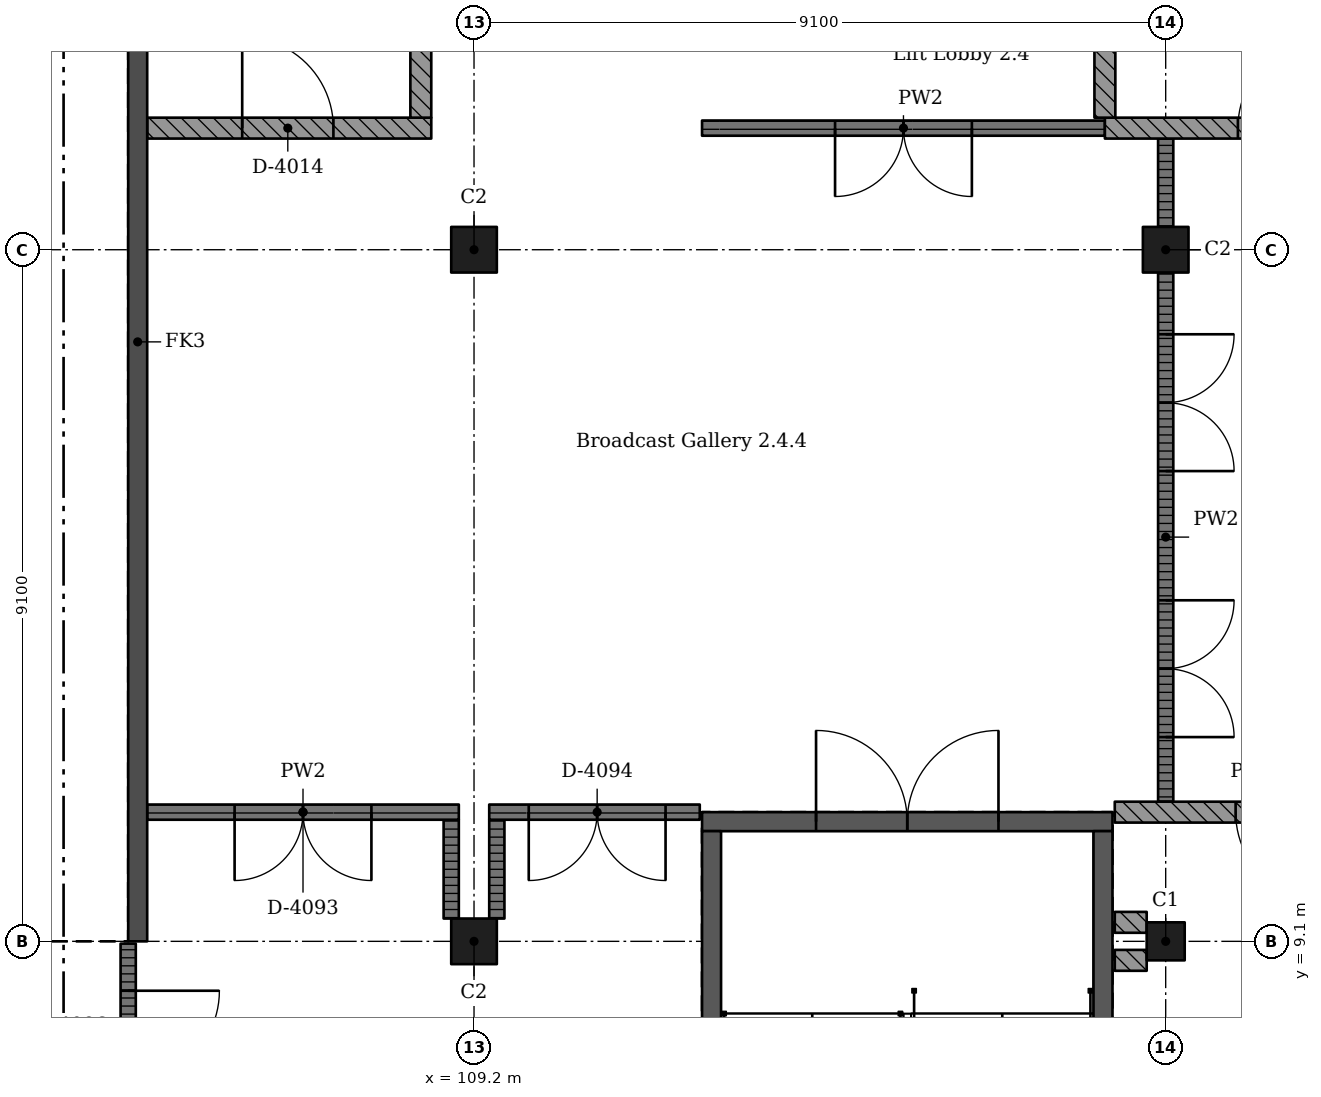
"""IFC4 building model, lengths in metres.
Left out: names, types, materials, properties, quantities, classifications, styles, units other than length and angle.
Written with IfcOpenShell. Run it as: python <this file> out.ifc"""

import sys

from ifc_helpers import new_model, si_unit, direction, frame, frame_2d, origin, origin_2d, place, context, subcontext, project, spatial, rectangle, extrude, element, fill, save


model = new_model("IFC4")
c1 = context("Model", 3, precision=1e-05, world=origin(), true_north=direction((0.0, 1.0)))
c2 = subcontext(c1, "Body", "Model", "MODEL_VIEW")
j1 = project(units=[si_unit("LENGTHUNIT", "METRE"), si_unit("PLANEANGLEUNIT", "RADIAN")], contexts=[c1])
p1 = place(None, origin())
s1 = spatial("IfcSite", under=j1, at=p1, CompositionType="ELEMENT")
p2 = place(p1, origin())
s2 = spatial("IfcBuilding", under=s1, at=p2, CompositionType="ELEMENT")
p3 = place(p2, frame((0.0, 0.0, 20.02)))
s3 = spatial("IfcBuildingStorey", under=s2, at=p3, CompositionType="ELEMENT", Elevation=20.02)
for number, where, z_axis, x_axis in (
    (1, (109.2, 9.1, 0.0), (0.0, 0.0, 1.0), (1.0, 0.0, 0.0)),
    (2, (109.2, 18.2, 0.0), (0.0, 0.0, 1.0), (1.0, 0.0, 0.0)),
):
    element("IfcColumn", number, at=place(p3, frame(where, z_axis=z_axis, x_axis=x_axis)), inside=s3, PredefinedType="COLUMN", context=c2, shape_type="SweptSolid", body=[
        extrude(rectangle(XDim=0.6, YDim=0.6, at=origin_2d()), origin(), (0.0, 0.0, 1.0), 4.55),
    ])
p4 = place(p3, frame((118.3, 9.1, 0.0), z_axis=(0.0, 0.0, 1.0), x_axis=(1.0, 0.0, 0.0)))
e3 = element("IfcColumn", 3, at=p4, inside=s3, PredefinedType="COLUMN", context=c2, shape_type="SweptSolid", body=[
    extrude(rectangle(XDim=0.5, YDim=0.5, at=origin_2d()), origin(), (0.0, 0.0, 1.0), 4.55),
])
p5 = place(p3, frame((118.3, 18.2, 0.0), z_axis=(0.0, 0.0, 1.0), x_axis=(1.0, 0.0, 0.0)))
e4 = element("IfcColumn", 4, at=p5, inside=s3, PredefinedType="COLUMN", context=c2, shape_type="SweptSolid", body=[
    extrude(rectangle(XDim=0.6, YDim=0.6, at=origin_2d()), origin(), (0.0, 0.0, 1.0), 4.55),
])
p6 = place(p3, frame((104.775, 40.95, 0.0), z_axis=(0.0, 0.0, 1.0), x_axis=(0.0, -1.0, 0.0)))
e5 = element("IfcWall", 5, at=p6, inside=s3, PredefinedType="SHEAR", context=c2, shape_type="SweptSolid", body=[
    extrude(rectangle(XDim=31.85, YDim=0.25, at=frame_2d((15.925, 0.0))), origin(), (0.0, 0.0, 1.0), 4.55),
])
p7 = place(p3, frame((117.6, 10.675, 0.0), z_axis=(0.0, 0.0, 1.0), x_axis=(-1.0, 0.0, 0.0)))
e6 = element("IfcWall", 6, at=p7, inside=s3, PredefinedType="SHEAR", context=c2, shape_type="SweptSolid", body=[
    extrude(rectangle(XDim=5.4, YDim=0.25, at=frame_2d((2.7, 0.0))), origin(), (0.0, 0.0, 1.0), 4.55),
])
p8 = place(p7, frame((1.5, 0.0, 0.0)))
e7 = element("IfcOpeningElement", 7, at=p8, cuts=e6, PredefinedType="OPENING", context=c2, shape_type="SweptSolid", body=[
    extrude(rectangle(XDim=2.4, YDim=2.1, at=frame_2d((1.2, 1.05))), frame((0.0, 0.135, 0.0), z_axis=(0.0, -1.0, 0.0), x_axis=(1.0, 0.0, 0.0)), (0.0, 0.0, 1.0), 0.27),
])
for number, where, z_axis, x_axis in (
    (8, (112.325, 10.55, 0.0), (0.0, 0.0, 1.0), (0.0, -1.0, 0.0)),
    (9, (117.475, 10.55, 0.0), (0.0, 0.0, 1.0), (0.0, -1.0, 0.0)),
):
    element("IfcWall", number, at=place(p3, frame(where, z_axis=z_axis, x_axis=x_axis)), inside=s3, PredefinedType="SHEAR", context=c2, shape_type="SweptSolid", body=[
        extrude(rectangle(XDim=9.6, YDim=0.25, at=frame_2d((4.8, 0.0))), origin(), (0.0, 0.0, 1.0), 4.55),
    ])
p9 = place(p3, frame((104.65, 5.5, 0.0), z_axis=(0.0, 0.0, 1.0), x_axis=(0.0, 1.0, 0.0)))
e10 = element("IfcWall", 10, at=p9, inside=s3, PredefinedType="PARTITIONING", context=c2, shape_type="SweptSolid", body=[
    extrude(rectangle(XDim=3.57, YDim=0.2, at=frame_2d((1.785, 0.0))), origin(), (0.0, 0.0, 1.0), 4.25),
])
p10 = place(p9, frame((0.55, 0.0, 0.0)))
e11 = element("IfcOpeningElement", 11, at=p10, cuts=e10, PredefinedType="OPENING", context=c2, shape_type="SweptSolid", body=[
    extrude(rectangle(XDim=2.4, YDim=2.4, at=frame_2d((1.2, 1.2))), frame((0.0, 0.11, 0.0), z_axis=(0.0, -1.0, 0.0), x_axis=(1.0, 0.0, 0.0)), (0.0, 0.0, 1.0), 0.22),
])
p11 = place(p3, frame((104.9, 19.8, 0.0), z_axis=(0.0, 0.0, 1.0), x_axis=(1.0, 0.0, 0.0)))
e12 = element("IfcWall", 12, at=p11, inside=s3, PredefinedType="SOLIDWALL", context=c2, shape_type="SweptSolid", body=[
    extrude(rectangle(XDim=3.738, YDim=0.275, at=frame_2d((1.869, 0.0))), origin(), (0.0, 0.0, 1.0), 4.25),
])
p12 = place(p11, frame((1.25, 0.0, 0.0)))
e13 = element("IfcOpeningElement", 13, at=p12, cuts=e12, PredefinedType="OPENING", context=c2, shape_type="SweptSolid", body=[
    extrude(rectangle(XDim=1.2, YDim=2.4, at=frame_2d((0.6, 1.2))), frame((0.0, 0.147, 0.0), z_axis=(0.0, -1.0, 0.0), x_axis=(1.0, 0.0, 0.0)), (0.0, 0.0, 1.0), 0.295),
])
p13 = place(p3, frame((108.5, 19.938, 0.0), z_axis=(0.0, 0.0, 1.0), x_axis=(0.0, 1.0, 0.0)))
e14 = element("IfcWall", 14, at=p13, inside=s3, PredefinedType="SOLIDWALL", context=c2, shape_type="SweptSolid", body=[
    extrude(rectangle(XDim=6.925, YDim=0.275, at=frame_2d((3.462, 0.0))), origin(), (0.0, 0.0, 1.0), 4.25),
])
p14 = place(p3, frame((108.9, 9.4, 0.0), z_axis=(0.0, 0.0, 1.0), x_axis=(0.0, 1.0, 0.0)))
e15 = element("IfcWall", 15, at=p14, inside=s3, PredefinedType="PARTITIONING", context=c2, shape_type="SweptSolid", body=[
    extrude(rectangle(XDim=1.3, YDim=0.2, at=frame_2d((0.65, 0.0))), origin(), (0.0, 0.0, 1.0), 4.25),
])
p15 = place(p3, frame((109.0, 10.8, 0.0), z_axis=(0.0, 0.0, 1.0), x_axis=(-1.0, 0.0, 0.0)))
e16 = element("IfcWall", 16, at=p15, inside=s3, PredefinedType="PARTITIONING", context=c2, shape_type="SweptSolid", body=[
    extrude(rectangle(XDim=4.1, YDim=0.2, at=frame_2d((2.05, 0.0))), origin(), (0.0, 0.0, 1.0), 4.25),
])
p16 = place(p15, frame((1.15, 0.0, 0.0)))
e17 = element("IfcOpeningElement", 17, at=p16, cuts=e16, PredefinedType="OPENING", context=c2, shape_type="SweptSolid", body=[
    extrude(rectangle(XDim=1.8, YDim=2.4, at=frame_2d((0.9, 1.2))), frame((0.0, 0.11, 0.0), z_axis=(0.0, -1.0, 0.0), x_axis=(1.0, 0.0, 0.0)), (0.0, 0.0, 1.0), 0.22),
])
p17 = place(p3, frame((109.5, 10.7, 0.0), z_axis=(0.0, 0.0, 1.0), x_axis=(0.0, -1.0, 0.0)))
e18 = element("IfcWall", 18, at=p17, inside=s3, PredefinedType="PARTITIONING", context=c2, shape_type="SweptSolid", body=[
    extrude(rectangle(XDim=1.3, YDim=0.2, at=frame_2d((0.65, 0.0))), origin(), (0.0, 0.0, 1.0), 4.25),
])
p18 = place(p3, frame((112.17, 10.8, 0.0), z_axis=(0.0, 0.0, 1.0), x_axis=(-1.0, 0.0, 0.0)))
e19 = element("IfcWall", 19, at=p18, inside=s3, PredefinedType="PARTITIONING", context=c2, shape_type="SweptSolid", body=[
    extrude(rectangle(XDim=2.77, YDim=0.2, at=frame_2d((1.385, 0.0))), origin(), (0.0, 0.0, 1.0), 4.25),
])
p19 = place(p18, frame((0.45, 0.0, 0.0)))
e20 = element("IfcOpeningElement", 20, at=p19, cuts=e19, PredefinedType="OPENING", context=c2, shape_type="SweptSolid", body=[
    extrude(rectangle(XDim=1.8, YDim=2.4, at=frame_2d((0.9, 1.2))), frame((0.0, 0.11, 0.0), z_axis=(0.0, -1.0, 0.0), x_axis=(1.0, 0.0, 0.0)), (0.0, 0.0, 1.0), 0.22),
])
p20 = place(p3, frame((112.2, 19.8, 0.0), z_axis=(0.0, 0.0, 1.0), x_axis=(1.0, 0.0, 0.0)))
e21 = element("IfcWall", 21, at=p20, inside=s3, PredefinedType="PARTITIONING", context=c2, shape_type="SweptSolid", body=[
    extrude(rectangle(XDim=5.3, YDim=0.2, at=frame_2d((2.65, 0.0))), origin(), (0.0, 0.0, 1.0), 4.25),
])
p21 = place(p20, frame((1.75, 0.0, 0.0)))
e22 = element("IfcOpeningElement", 22, at=p21, cuts=e21, PredefinedType="OPENING", context=c2, shape_type="SweptSolid", body=[
    extrude(rectangle(XDim=1.8, YDim=2.4, at=frame_2d((0.9, 1.2))), frame((0.0, 0.11, 0.0), z_axis=(0.0, -1.0, 0.0), x_axis=(1.0, 0.0, 0.0)), (0.0, 0.0, 1.0), 0.22),
])
p22 = place(p3, frame((117.5, 19.8, 0.0), z_axis=(0.0, 0.0, 1.0), x_axis=(1.0, 0.0, 0.0)))
e23 = element("IfcWall", 23, at=p22, inside=s3, PredefinedType="SOLIDWALL", context=c2, shape_type="SweptSolid", body=[
    extrude(rectangle(XDim=3.8, YDim=0.275, at=frame_2d((1.9, 0.0))), origin(), (0.0, 0.0, 1.0), 4.25),
])
p23 = place(p22, frame((1.75, 0.0, 0.0)))
e24 = element("IfcOpeningElement", 24, at=p23, cuts=e23, PredefinedType="OPENING", context=c2, shape_type="SweptSolid", body=[
    extrude(rectangle(XDim=1.2, YDim=2.4, at=frame_2d((0.6, 1.2))), frame((0.0, 0.147, 0.0), z_axis=(0.0, -1.0, 0.0), x_axis=(1.0, 0.0, 0.0)), (0.0, 0.0, 1.0), 0.295),
])
p24 = place(p3, frame((117.5, 19.938, 0.0), z_axis=(0.0, 0.0, 1.0), x_axis=(0.0, 1.0, 0.0)))
e25 = element("IfcWall", 25, at=p24, inside=s3, PredefinedType="SOLIDWALL", context=c2, shape_type="SweptSolid", body=[
    extrude(rectangle(XDim=2.833, YDim=0.275, at=frame_2d((1.416, 0.0))), origin(), (0.0, 0.0, 1.0), 4.25),
])
for number, where, z_axis, x_axis in (
    (26, (117.63, 8.85, 0.0), (0.0, 0.0, 1.0), (1.0, 0.0, 0.0)),
    (27, (118.05, 9.35, 0.0), (0.0, 0.0, 1.0), (-1.0, 0.0, 0.0)),
):
    element("IfcWall", number, at=place(p3, frame(where, z_axis=z_axis, x_axis=x_axis)), inside=s3, PredefinedType="SOLIDWALL", context=c2, shape_type="SweptSolid", body=[
        extrude(rectangle(XDim=0.42, YDim=0.275, at=frame_2d((0.21, 0.0))), origin(), (0.0, 0.0, 1.0), 4.25),
    ])
p25 = place(p3, frame((117.63, 10.8, 0.0), z_axis=(0.0, 0.0, 1.0), x_axis=(1.0, 0.0, 0.0)))
e28 = element("IfcWall", 28, at=p25, inside=s3, PredefinedType="SOLIDWALL", context=c2, shape_type="SweptSolid", body=[
    extrude(rectangle(XDim=3.64, YDim=0.275, at=frame_2d((1.82, 0.0))), origin(), (0.0, 0.0, 1.0), 4.25),
])
p26 = place(p25, frame((1.59, 0.0, 0.0)))
e29 = element("IfcOpeningElement", 29, at=p26, cuts=e28, PredefinedType="OPENING", context=c2, shape_type="SweptSolid", body=[
    extrude(rectangle(XDim=1.2, YDim=2.4, at=frame_2d((0.6, 1.2))), frame((0.0, 0.147, 0.0), z_axis=(0.0, -1.0, 0.0), x_axis=(1.0, 0.0, 0.0)), (0.0, 0.0, 1.0), 0.295),
])
p27 = place(p3, frame((118.3, 10.938, 0.0), z_axis=(0.0, 0.0, 1.0), x_axis=(0.0, 1.0, 0.0)))
e30 = element("IfcWall", 30, at=p27, inside=s3, PredefinedType="PARTITIONING", context=c2, shape_type="SweptSolid", body=[
    extrude(rectangle(XDim=6.962, YDim=0.2, at=frame_2d((3.481, 0.0))), origin(), (0.0, 0.0, 1.0), 3.5),
])
p28 = place(p27, frame((0.85, 0.0, 0.0)))
e31 = element("IfcOpeningElement", 31, at=p28, cuts=e30, PredefinedType="OPENING", context=c2, shape_type="SweptSolid", body=[
    extrude(rectangle(XDim=1.8, YDim=2.4, at=frame_2d((0.9, 1.2))), frame((0.0, 0.11, 0.0), z_axis=(0.0, -1.0, 0.0), x_axis=(1.0, 0.0, 0.0)), (0.0, 0.0, 1.0), 0.22),
])
p29 = place(p27, frame((4.35, 0.0, 0.0)))
e32 = element("IfcOpeningElement", 32, at=p29, cuts=e30, PredefinedType="OPENING", context=c2, shape_type="SweptSolid", body=[
    extrude(rectangle(XDim=1.8, YDim=2.4, at=frame_2d((0.9, 1.2))), frame((0.0, 0.11, 0.0), z_axis=(0.0, -1.0, 0.0), x_axis=(1.0, 0.0, 0.0)), (0.0, 0.0, 1.0), 0.22),
])
p30 = place(p3, frame((118.3, 18.5, 0.0), z_axis=(0.0, 0.0, 1.0), x_axis=(0.0, 1.0, 0.0)))
e33 = element("IfcWall", 33, at=p30, inside=s3, PredefinedType="PARTITIONING", context=c2, shape_type="SweptSolid", body=[
    extrude(rectangle(XDim=1.163, YDim=0.2, at=frame_2d((0.581, 0.0))), origin(), (0.0, 0.0, 1.0), 3.5),
])
p31 = place(p23, origin())
e34 = element("IfcDoor", 34, at=p31, inside=s3, OperationType="SINGLE_SWING_LEFT", PredefinedType="DOOR", context=c2, shape_type="SweptSolid", body=[
    extrude(rectangle(XDim=1.2, YDim=2.4, at=frame_2d((0.6, 1.2))), frame((0.0, 0.025, 0.0), z_axis=(0.0, -1.0, 0.0), x_axis=(1.0, 0.0, 0.0)), (0.0, 0.0, 1.0), 0.05),
])
fill(e24, e34)
p32 = place(p12, origin())
e35 = element("IfcDoor", 35, at=p32, inside=s3, OperationType="SINGLE_SWING_RIGHT", PredefinedType="DOOR", context=c2, shape_type="SweptSolid", body=[
    extrude(rectangle(XDim=1.2, YDim=2.4, at=frame_2d((0.6, 1.2))), frame((0.0, 0.025, 0.0), z_axis=(0.0, -1.0, 0.0), x_axis=(1.0, 0.0, 0.0)), (0.0, 0.0, 1.0), 0.05),
])
fill(e13, e35)
p33 = place(p26, origin())
e36 = element("IfcDoor", 36, at=p33, inside=s3, OperationType="SINGLE_SWING_RIGHT", PredefinedType="DOOR", context=c2, shape_type="SweptSolid", body=[
    extrude(rectangle(XDim=1.2, YDim=2.4, at=frame_2d((0.6, 1.2))), frame((0.0, 0.025, 0.0), z_axis=(0.0, -1.0, 0.0), x_axis=(1.0, 0.0, 0.0)), (0.0, 0.0, 1.0), 0.05),
])
fill(e29, e36)
p34 = place(p28, origin())
e37 = element("IfcDoor", 37, at=p34, inside=s3, OperationType="DOUBLE_DOOR_SINGLE_SWING", PredefinedType="DOOR", context=c2, shape_type="SweptSolid", body=[
    extrude(rectangle(XDim=1.8, YDim=2.4, at=frame_2d((0.9, 1.2))), frame((0.0, 0.025, 0.0), z_axis=(0.0, -1.0, 0.0), x_axis=(1.0, 0.0, 0.0)), (0.0, 0.0, 1.0), 0.05),
])
fill(e31, e37)
p35 = place(p29, origin())
e38 = element("IfcDoor", 38, at=p35, inside=s3, OperationType="DOUBLE_DOOR_SINGLE_SWING", PredefinedType="DOOR", context=c2, shape_type="SweptSolid", body=[
    extrude(rectangle(XDim=1.8, YDim=2.4, at=frame_2d((0.9, 1.2))), frame((0.0, 0.025, 0.0), z_axis=(0.0, -1.0, 0.0), x_axis=(1.0, 0.0, 0.0)), (0.0, 0.0, 1.0), 0.05),
])
fill(e32, e38)
p36 = place(p21, origin())
e39 = element("IfcDoor", 39, at=p36, inside=s3, OperationType="DOUBLE_DOOR_SINGLE_SWING", PredefinedType="DOOR", context=c2, shape_type="SweptSolid", body=[
    extrude(rectangle(XDim=1.8, YDim=2.4, at=frame_2d((0.9, 1.2))), frame((0.0, 0.025, 0.0), z_axis=(0.0, -1.0, 0.0), x_axis=(1.0, 0.0, 0.0)), (0.0, 0.0, 1.0), 0.05),
])
fill(e22, e39)
p37 = place(p16, origin())
e40 = element("IfcDoor", 40, at=p37, inside=s3, OperationType="DOUBLE_DOOR_SINGLE_SWING", PredefinedType="DOOR", context=c2, shape_type="SweptSolid", body=[
    extrude(rectangle(XDim=1.8, YDim=2.4, at=frame_2d((0.9, 1.2))), frame((0.0, 0.025, 0.0), z_axis=(0.0, -1.0, 0.0), x_axis=(1.0, 0.0, 0.0)), (0.0, 0.0, 1.0), 0.05),
])
fill(e17, e40)
p38 = place(p19, origin())
e41 = element("IfcDoor", 41, at=p38, inside=s3, OperationType="DOUBLE_DOOR_SINGLE_SWING", PredefinedType="DOOR", context=c2, shape_type="SweptSolid", body=[
    extrude(rectangle(XDim=1.8, YDim=2.4, at=frame_2d((0.9, 1.2))), frame((0.0, 0.025, 0.0), z_axis=(0.0, -1.0, 0.0), x_axis=(1.0, 0.0, 0.0)), (0.0, 0.0, 1.0), 0.05),
])
fill(e20, e41)
p39 = place(p10, origin())
e42 = element("IfcDoor", 42, at=p39, inside=s3, OperationType="DOUBLE_DOOR_SINGLE_SWING", PredefinedType="DOOR", context=c2, shape_type="SweptSolid", body=[
    extrude(rectangle(XDim=2.4, YDim=2.4, at=frame_2d((1.2, 1.2))), frame((0.0, 0.025, 0.0), z_axis=(0.0, -1.0, 0.0), x_axis=(1.0, 0.0, 0.0)), (0.0, 0.0, 1.0), 0.05),
])
fill(e11, e42)
p40 = place(p8, origin())
e43 = element("IfcDoor", 43, at=p40, inside=s3, OperationType="DOUBLE_DOOR_SINGLE_SWING", PredefinedType="DOOR", context=c2, shape_type="SweptSolid", body=[
    extrude(rectangle(XDim=2.4, YDim=2.1, at=frame_2d((1.2, 1.05))), frame((0.0, 0.025, 0.0), z_axis=(0.0, -1.0, 0.0), x_axis=(1.0, 0.0, 0.0)), (0.0, 0.0, 1.0), 0.05),
])
fill(e7, e43)
save(model, sys.argv[1])
